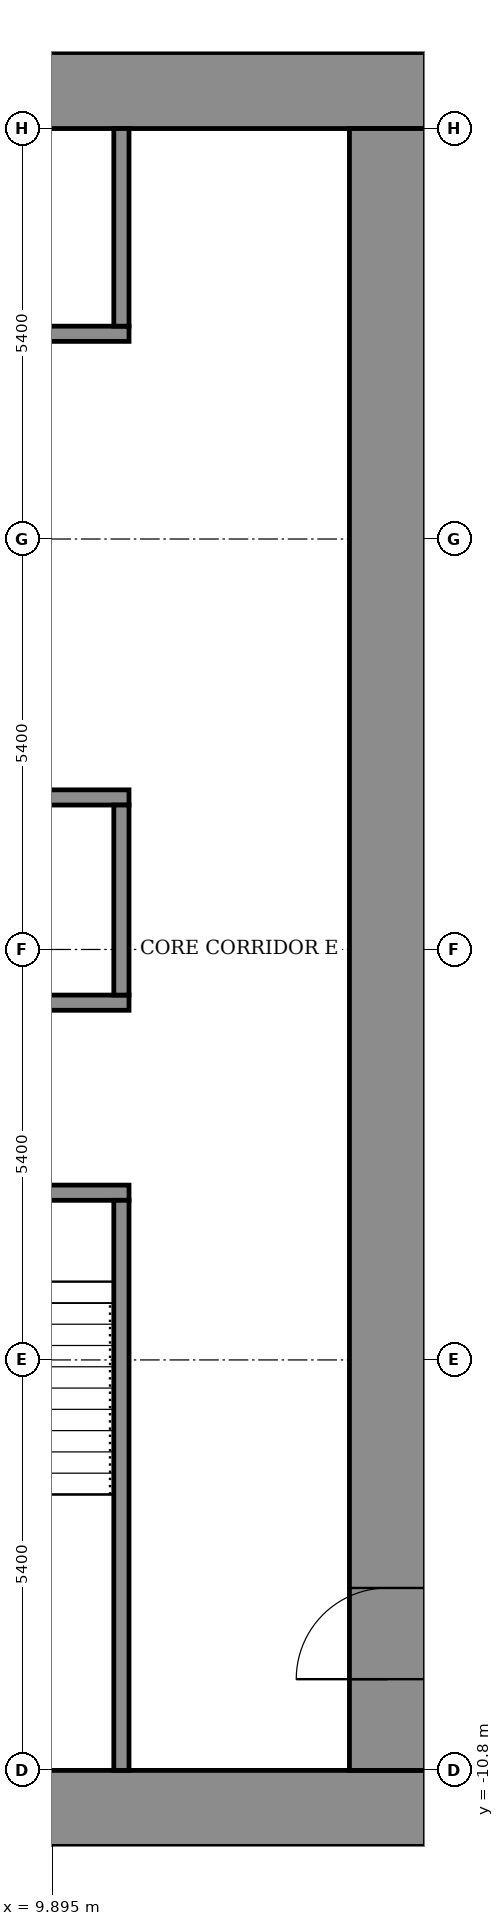
"""IFC4 building model, lengths in metres.
Left out: names, types, materials, properties, quantities, classifications, styles, units other than length and angle.
Written with IfcOpenShell. Run it as: python <this file> out.ifc"""

import sys

from ifc_helpers import new_model, si_unit, direction, frame, frame_2d, origin, place, context, subcontext, project, spatial, rectangle, extrude, element, fill, save


model = new_model("IFC4")
c1 = context("Model", 3, precision=1e-05, world=origin(), true_north=direction((0.0, 1.0)))
c2 = subcontext(c1, "Body", "Model", "MODEL_VIEW")
j1 = project(units=[si_unit("LENGTHUNIT", "METRE"), si_unit("PLANEANGLEUNIT", "RADIAN")], contexts=[c1])
p1 = place(None, origin())
s1 = spatial("IfcSite", under=j1, at=p1, CompositionType="ELEMENT")
p2 = place(p1, origin())
s2 = spatial("IfcBuilding", under=s1, at=p2, CompositionType="ELEMENT")
p3 = place(p2, frame((0.0, 0.0, 90.1)))
s3 = spatial("IfcBuildingStorey", under=s2, at=p3, CompositionType="ELEMENT", Elevation=90.1)
for number, where, z_axis, x_axis in (
    (1, (-14.8, -11.3, 0.0), (0.0, 0.0, 1.0), (1.0, 0.0, 0.0)),
    (2, (-14.8, 11.3, 0.0), (0.0, 0.0, 1.0), (1.0, 0.0, 0.0)),
):
    element("IfcWall", number, at=place(p3, frame(where, z_axis=z_axis, x_axis=x_axis)), inside=s3, PredefinedType="SHEAR", context=c2, shape_type="SweptSolid", body=[
        extrude(rectangle(XDim=29.6, YDim=1.0, at=frame_2d((14.8, 0.0))), origin(), (0.0, 0.0, 1.0), 3.6),
    ])
p4 = place(p3, frame((14.3, -10.8, 0.0), z_axis=(0.0, 0.0, 1.0), x_axis=(0.0, 1.0, 0.0)))
e3 = element("IfcWall", 3, at=p4, inside=s3, PredefinedType="SHEAR", context=c2, shape_type="SweptSolid", body=[
    extrude(rectangle(XDim=21.6, YDim=1.0, at=frame_2d((10.8, 0.0))), origin(), (0.0, 0.0, 1.0), 3.6),
])
p5 = place(p4, frame((1.2, 0.0, 0.0)))
e4 = element("IfcOpeningElement", 4, at=p5, cuts=e3, PredefinedType="OPENING", context=c2, shape_type="SweptSolid", body=[
    extrude(rectangle(XDim=1.2, YDim=2.1, at=frame_2d((0.6, 1.05))), frame((0.0, 0.51, 0.0), z_axis=(0.0, -1.0, 0.0), x_axis=(1.0, 0.0, 0.0)), (0.0, 0.0, 1.0), 1.02),
])
p6 = place(p3, frame((-10.9, -3.2, 0.0), z_axis=(0.0, 0.0, 1.0), x_axis=(1.0, 0.0, 0.0)))
e5 = element("IfcWall", 5, at=p6, inside=s3, PredefinedType="SHEAR", context=c2, shape_type="SweptSolid", body=[
    extrude(rectangle(XDim=21.8, YDim=0.2, at=frame_2d((10.9, 0.0))), origin(), (0.0, 0.0, 1.0), 3.05),
])
p7 = place(p6, frame((1.075, 0.0, 0.0)))
e6 = element("IfcOpeningElement", 6, at=p7, cuts=e5, PredefinedType="OPENING", context=c2, shape_type="SweptSolid", body=[
    extrude(rectangle(XDim=1.1, YDim=2.1, at=frame_2d((0.55, 1.05))), frame((0.0, 0.11, 0.0), z_axis=(0.0, -1.0, 0.0), x_axis=(1.0, 0.0, 0.0)), (0.0, 0.0, 1.0), 0.22),
])
p8 = place(p6, frame((10.325, 0.0, 0.0)))
e7 = element("IfcOpeningElement", 7, at=p8, cuts=e5, PredefinedType="OPENING", context=c2, shape_type="SweptSolid", body=[
    extrude(rectangle(XDim=1.1, YDim=2.1, at=frame_2d((0.55, 1.05))), frame((0.0, 0.11, 0.0), z_axis=(0.0, -1.0, 0.0), x_axis=(1.0, 0.0, 0.0)), (0.0, 0.0, 1.0), 0.22),
])
p9 = place(p6, frame((19.625, 0.0, 0.0)))
e8 = element("IfcOpeningElement", 8, at=p9, cuts=e5, PredefinedType="OPENING", context=c2, shape_type="SweptSolid", body=[
    extrude(rectangle(XDim=1.1, YDim=2.1, at=frame_2d((0.55, 1.05))), frame((0.0, 0.11, 0.0), z_axis=(0.0, -1.0, 0.0), x_axis=(1.0, 0.0, 0.0)), (0.0, 0.0, 1.0), 0.22),
])
p10 = place(p6, frame((5.7, 0.0, 0.0)))
e9 = element("IfcOpeningElement", 9, at=p10, cuts=e5, PredefinedType="OPENING", context=c2, shape_type="SweptSolid", body=[
    extrude(rectangle(XDim=1.1, YDim=2.1, at=frame_2d((0.55, 1.05))), frame((0.0, 0.11, 0.0), z_axis=(0.0, -1.0, 0.0), x_axis=(1.0, 0.0, 0.0)), (0.0, 0.0, 1.0), 0.22),
])
p11 = place(p6, frame((14.975, 0.0, 0.0)))
e10 = element("IfcOpeningElement", 10, at=p11, cuts=e5, PredefinedType="OPENING", context=c2, shape_type="SweptSolid", body=[
    extrude(rectangle(XDim=1.1, YDim=2.1, at=frame_2d((0.55, 1.05))), frame((0.0, 0.11, 0.0), z_axis=(0.0, -1.0, 0.0), x_axis=(1.0, 0.0, 0.0)), (0.0, 0.0, 1.0), 0.22),
])
p12 = place(p3, frame((-10.9, -0.7, 0.0), z_axis=(0.0, 0.0, 1.0), x_axis=(1.0, 0.0, 0.0)))
e11 = element("IfcWall", 11, at=p12, inside=s3, PredefinedType="SHEAR", context=c2, shape_type="SweptSolid", body=[
    extrude(rectangle(XDim=21.8, YDim=0.2, at=frame_2d((10.9, 0.0))), origin(), (0.0, 0.0, 1.0), 3.05),
])
p13 = place(p3, frame((-10.9, 2.0, 0.0), z_axis=(0.0, 0.0, 1.0), x_axis=(1.0, 0.0, 0.0)))
e12 = element("IfcWall", 12, at=p13, inside=s3, PredefinedType="SHEAR", context=c2, shape_type="SweptSolid", body=[
    extrude(rectangle(XDim=21.8, YDim=0.2, at=frame_2d((10.9, 0.0))), origin(), (0.0, 0.0, 1.0), 3.05),
])
p14 = place(p13, frame((0.9, 0.0, 0.0)))
e13 = element("IfcOpeningElement", 13, at=p14, cuts=e12, PredefinedType="OPENING", context=c2, shape_type="SweptSolid", body=[
    extrude(rectangle(XDim=1.1, YDim=2.1, at=frame_2d((0.55, 1.05))), frame((0.0, 0.11, 0.0), z_axis=(0.0, -1.0, 0.0), x_axis=(1.0, 0.0, 0.0)), (0.0, 0.0, 1.0), 0.22),
])
p15 = place(p13, frame((3.6, 0.0, 0.0)))
e14 = element("IfcOpeningElement", 14, at=p15, cuts=e12, PredefinedType="OPENING", context=c2, shape_type="SweptSolid", body=[
    extrude(rectangle(XDim=1.1, YDim=2.1, at=frame_2d((0.55, 1.05))), frame((0.0, 0.11, 0.0), z_axis=(0.0, -1.0, 0.0), x_axis=(1.0, 0.0, 0.0)), (0.0, 0.0, 1.0), 0.22),
])
p16 = place(p13, frame((6.3, 0.0, 0.0)))
e15 = element("IfcOpeningElement", 15, at=p16, cuts=e12, PredefinedType="OPENING", context=c2, shape_type="SweptSolid", body=[
    extrude(rectangle(XDim=1.1, YDim=2.1, at=frame_2d((0.55, 1.05))), frame((0.0, 0.11, 0.0), z_axis=(0.0, -1.0, 0.0), x_axis=(1.0, 0.0, 0.0)), (0.0, 0.0, 1.0), 0.22),
])
p17 = place(p13, frame((9.0, 0.0, 0.0)))
e16 = element("IfcOpeningElement", 16, at=p17, cuts=e12, PredefinedType="OPENING", context=c2, shape_type="SweptSolid", body=[
    extrude(rectangle(XDim=1.1, YDim=2.1, at=frame_2d((0.55, 1.05))), frame((0.0, 0.11, 0.0), z_axis=(0.0, -1.0, 0.0), x_axis=(1.0, 0.0, 0.0)), (0.0, 0.0, 1.0), 0.22),
])
p18 = place(p13, frame((11.7, 0.0, 0.0)))
e17 = element("IfcOpeningElement", 17, at=p18, cuts=e12, PredefinedType="OPENING", context=c2, shape_type="SweptSolid", body=[
    extrude(rectangle(XDim=1.1, YDim=2.1, at=frame_2d((0.55, 1.05))), frame((0.0, 0.11, 0.0), z_axis=(0.0, -1.0, 0.0), x_axis=(1.0, 0.0, 0.0)), (0.0, 0.0, 1.0), 0.22),
])
p19 = place(p13, frame((15.175, 0.0, 0.0)))
e18 = element("IfcOpeningElement", 18, at=p19, cuts=e12, PredefinedType="OPENING", context=c2, shape_type="SweptSolid", body=[
    extrude(rectangle(XDim=0.9, YDim=2.1, at=frame_2d((0.45, 1.05))), frame((0.0, 0.11, 0.0), z_axis=(0.0, -1.0, 0.0), x_axis=(1.0, 0.0, 0.0)), (0.0, 0.0, 1.0), 0.22),
])
p20 = place(p13, frame((19.225, 0.0, 0.0)))
e19 = element("IfcOpeningElement", 19, at=p20, cuts=e12, PredefinedType="OPENING", context=c2, shape_type="SweptSolid", body=[
    extrude(rectangle(XDim=0.9, YDim=2.1, at=frame_2d((0.45, 1.05))), frame((0.0, 0.11, 0.0), z_axis=(0.0, -1.0, 0.0), x_axis=(1.0, 0.0, 0.0)), (0.0, 0.0, 1.0), 0.22),
])
p21 = place(p3, frame((-10.9, 8.1, 0.0), z_axis=(0.0, 0.0, 1.0), x_axis=(1.0, 0.0, 0.0)))
e20 = element("IfcWall", 20, at=p21, inside=s3, PredefinedType="SHEAR", context=c2, shape_type="SweptSolid", body=[
    extrude(rectangle(XDim=21.8, YDim=0.2, at=frame_2d((10.9, 0.0))), origin(), (0.0, 0.0, 1.0), 3.05),
])
p22 = place(p21, frame((0.9, 0.0, 0.0)))
e21 = element("IfcOpeningElement", 21, at=p22, cuts=e20, PredefinedType="OPENING", context=c2, shape_type="SweptSolid", body=[
    extrude(rectangle(XDim=1.1, YDim=2.1, at=frame_2d((0.55, 1.05))), frame((0.0, 0.11, 0.0), z_axis=(0.0, -1.0, 0.0), x_axis=(1.0, 0.0, 0.0)), (0.0, 0.0, 1.0), 0.22),
])
p23 = place(p21, frame((3.6, 0.0, 0.0)))
e22 = element("IfcOpeningElement", 22, at=p23, cuts=e20, PredefinedType="OPENING", context=c2, shape_type="SweptSolid", body=[
    extrude(rectangle(XDim=1.1, YDim=2.1, at=frame_2d((0.55, 1.05))), frame((0.0, 0.11, 0.0), z_axis=(0.0, -1.0, 0.0), x_axis=(1.0, 0.0, 0.0)), (0.0, 0.0, 1.0), 0.22),
])
p24 = place(p21, frame((6.3, 0.0, 0.0)))
e23 = element("IfcOpeningElement", 23, at=p24, cuts=e20, PredefinedType="OPENING", context=c2, shape_type="SweptSolid", body=[
    extrude(rectangle(XDim=1.1, YDim=2.1, at=frame_2d((0.55, 1.05))), frame((0.0, 0.11, 0.0), z_axis=(0.0, -1.0, 0.0), x_axis=(1.0, 0.0, 0.0)), (0.0, 0.0, 1.0), 0.22),
])
p25 = place(p21, frame((9.0, 0.0, 0.0)))
e24 = element("IfcOpeningElement", 24, at=p25, cuts=e20, PredefinedType="OPENING", context=c2, shape_type="SweptSolid", body=[
    extrude(rectangle(XDim=1.1, YDim=2.1, at=frame_2d((0.55, 1.05))), frame((0.0, 0.11, 0.0), z_axis=(0.0, -1.0, 0.0), x_axis=(1.0, 0.0, 0.0)), (0.0, 0.0, 1.0), 0.22),
])
p26 = place(p21, frame((11.7, 0.0, 0.0)))
e25 = element("IfcOpeningElement", 25, at=p26, cuts=e20, PredefinedType="OPENING", context=c2, shape_type="SweptSolid", body=[
    extrude(rectangle(XDim=1.1, YDim=2.1, at=frame_2d((0.55, 1.05))), frame((0.0, 0.11, 0.0), z_axis=(0.0, -1.0, 0.0), x_axis=(1.0, 0.0, 0.0)), (0.0, 0.0, 1.0), 0.22),
])
p27 = place(p21, frame((15.175, 0.0, 0.0)))
e26 = element("IfcOpeningElement", 26, at=p27, cuts=e20, PredefinedType="OPENING", context=c2, shape_type="SweptSolid", body=[
    extrude(rectangle(XDim=0.9, YDim=2.1, at=frame_2d((0.45, 1.05))), frame((0.0, 0.11, 0.0), z_axis=(0.0, -1.0, 0.0), x_axis=(1.0, 0.0, 0.0)), (0.0, 0.0, 1.0), 0.22),
])
p28 = place(p21, frame((19.225, 0.0, 0.0)))
e27 = element("IfcOpeningElement", 27, at=p28, cuts=e20, PredefinedType="OPENING", context=c2, shape_type="SweptSolid", body=[
    extrude(rectangle(XDim=0.9, YDim=2.1, at=frame_2d((0.45, 1.05))), frame((0.0, 0.11, 0.0), z_axis=(0.0, -1.0, 0.0), x_axis=(1.0, 0.0, 0.0)), (0.0, 0.0, 1.0), 0.22),
])
p29 = place(p3, frame((10.8, -10.8, 0.0), z_axis=(0.0, 0.0, 1.0), x_axis=(0.0, 1.0, 0.0)))
e28 = element("IfcWall", 28, at=p29, inside=s3, PredefinedType="SHEAR", context=c2, shape_type="SweptSolid", body=[
    extrude(rectangle(XDim=7.5, YDim=0.2, at=frame_2d((3.75, 0.0))), origin(), (0.0, 0.0, 1.0), 3.05),
])
p30 = place(p3, frame((10.8, -0.6, 0.0), z_axis=(0.0, 0.0, 1.0), x_axis=(0.0, 1.0, 0.0)))
e29 = element("IfcWall", 29, at=p30, inside=s3, PredefinedType="STANDARD", context=c2, shape_type="SweptSolid", body=[
    extrude(rectangle(XDim=2.5, YDim=0.2, at=frame_2d((1.25, 0.0))), origin(), (0.0, 0.0, 1.0), 3.05),
])
p31 = place(p3, frame((10.8, 8.2, 0.0), z_axis=(0.0, 0.0, 1.0), x_axis=(0.0, 1.0, 0.0)))
e30 = element("IfcWall", 30, at=p31, inside=s3, PredefinedType="STANDARD", context=c2, shape_type="SweptSolid", body=[
    extrude(rectangle(XDim=2.6, YDim=0.2, at=frame_2d((1.3, 0.0))), origin(), (0.0, 0.0, 1.0), 3.05),
])
p32 = place(p5, origin())
e31 = element("IfcDoor", 31, at=p32, inside=s3, OperationType="DOUBLE_DOOR_SINGLE_SWING", PredefinedType="DOOR", context=c2, shape_type="SweptSolid", body=[
    extrude(rectangle(XDim=1.2, YDim=2.1, at=frame_2d((0.6, 1.05))), frame((0.0, 0.025, 0.0), z_axis=(0.0, -1.0, 0.0), x_axis=(1.0, 0.0, 0.0)), (0.0, 0.0, 1.0), 0.05),
])
fill(e4, e31)
save(model, sys.argv[1])
